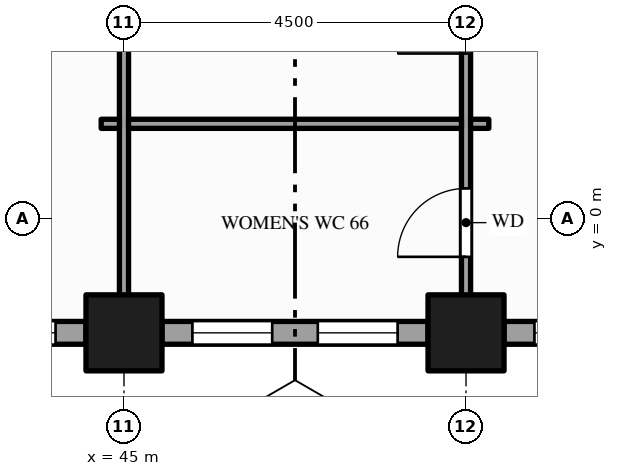
"""IFC4 building model, lengths in metres.
Left out: names, types, materials, properties, quantities, classifications, styles, units other than length and angle.
Written with IfcOpenShell. Run it as: python <this file> out.ifc"""

import sys

from ifc_helpers import new_model, si_unit, direction, frame, frame_2d, origin, origin_2d, place, context, subcontext, project, spatial, rectangle, hollow_rectangle, extrude, element, fill, save


model = new_model("IFC4")
c1 = context("Model", 3, precision=1e-05, world=origin(), true_north=direction((0.0, 1.0)))
c2 = subcontext(c1, "Body", "Model", "MODEL_VIEW")
j1 = project(units=[si_unit("LENGTHUNIT", "METRE"), si_unit("PLANEANGLEUNIT", "RADIAN")], contexts=[c1])
p1 = place(None, origin())
s1 = spatial("IfcSite", under=j1, at=p1, CompositionType="ELEMENT")
p2 = place(p1, origin())
s2 = spatial("IfcBuilding", under=s1, at=p2, CompositionType="ELEMENT")
p3 = place(p2, frame((0.0, 0.0, 103.0)))
s3 = spatial("IfcBuildingStorey", under=s2, at=p3, CompositionType="ELEMENT", Elevation=103.0)
for number, where, z_axis, x_axis in (
    (1, (45.0, -1.5, -0.15), (0.0, 0.0, 1.0), (1.0, 0.0, 0.0)),
    (2, (49.5, -1.5, -0.15), (0.0, 0.0, 1.0), (1.0, 0.0, 0.0)),
):
    element("IfcColumn", number, at=place(p3, frame(where, z_axis=z_axis, x_axis=x_axis)), inside=s3, PredefinedType="COLUMN", context=c2, shape_type="SweptSolid", body=[
        extrude(hollow_rectangle(XDim=1.0, YDim=1.0, WallThickness=0.05, at=origin_2d()), origin(), (0.0, 0.0, 1.0), 4.0),
    ])
p4 = place(p3, frame((41.0, -1.5, 0.0), z_axis=(0.0, 0.0, 1.0), x_axis=(1.0, 0.0, 0.0)))
e3 = element("IfcWall", 3, at=p4, inside=s3, PredefinedType="STANDARD", context=c2, shape_type="SweptSolid", body=[
    extrude(rectangle(XDim=3.5, YDim=0.3, at=frame_2d((1.75, 0.0))), origin(), (0.0, 0.0, 1.0), 3.154),
])
p5 = place(p4, frame((0.4, 0.0, 0.9)))
e4 = element("IfcOpeningElement", 4, at=p5, cuts=e3, PredefinedType="OPENING", context=c2, shape_type="SweptSolid", body=[
    extrude(rectangle(XDim=1.05, YDim=2.0, at=frame_2d((0.525, 1.0))), frame((0.0, 0.16, 0.0), z_axis=(0.0, -1.0, 0.0), x_axis=(1.0, 0.0, 0.0)), (0.0, 0.0, 1.0), 0.32),
])
p6 = place(p4, frame((2.05, 0.0, 0.9)))
e5 = element("IfcOpeningElement", 5, at=p6, cuts=e3, PredefinedType="OPENING", context=c2, shape_type="SweptSolid", body=[
    extrude(rectangle(XDim=1.05, YDim=2.0, at=frame_2d((0.525, 1.0))), frame((0.0, 0.16, 0.0), z_axis=(0.0, -1.0, 0.0), x_axis=(1.0, 0.0, 0.0)), (0.0, 0.0, 1.0), 0.32),
])
p7 = place(p3, frame((45.5, -1.5, 0.0), z_axis=(0.0, 0.0, 1.0), x_axis=(1.0, 0.0, 0.0)))
e6 = element("IfcWall", 6, at=p7, inside=s3, PredefinedType="STANDARD", context=c2, shape_type="SweptSolid", body=[
    extrude(rectangle(XDim=3.5, YDim=0.3, at=frame_2d((1.75, 0.0))), origin(), (0.0, 0.0, 1.0), 3.154),
])
p8 = place(p7, frame((0.4, 0.0, 0.9)))
e7 = element("IfcOpeningElement", 7, at=p8, cuts=e6, PredefinedType="OPENING", context=c2, shape_type="SweptSolid", body=[
    extrude(rectangle(XDim=1.05, YDim=2.0, at=frame_2d((0.525, 1.0))), frame((0.0, 0.16, 0.0), z_axis=(0.0, -1.0, 0.0), x_axis=(1.0, 0.0, 0.0)), (0.0, 0.0, 1.0), 0.32),
])
p9 = place(p7, frame((2.05, 0.0, 0.9)))
e8 = element("IfcOpeningElement", 8, at=p9, cuts=e6, PredefinedType="OPENING", context=c2, shape_type="SweptSolid", body=[
    extrude(rectangle(XDim=1.05, YDim=2.0, at=frame_2d((0.525, 1.0))), frame((0.0, 0.16, 0.0), z_axis=(0.0, -1.0, 0.0), x_axis=(1.0, 0.0, 0.0)), (0.0, 0.0, 1.0), 0.32),
])
p10 = place(p3, frame((50.0, -1.5, 0.0), z_axis=(0.0, 0.0, 1.0), x_axis=(1.0, 0.0, 0.0)))
e9 = element("IfcWall", 9, at=p10, inside=s3, PredefinedType="STANDARD", context=c2, shape_type="SweptSolid", body=[
    extrude(rectangle(XDim=3.5, YDim=0.3, at=frame_2d((1.75, 0.0))), origin(), (0.0, 0.0, 1.0), 3.154),
])
p11 = place(p10, frame((0.4, 0.0, 0.9)))
e10 = element("IfcOpeningElement", 10, at=p11, cuts=e9, PredefinedType="OPENING", context=c2, shape_type="SweptSolid", body=[
    extrude(rectangle(XDim=1.05, YDim=2.0, at=frame_2d((0.525, 1.0))), frame((0.0, 0.16, 0.0), z_axis=(0.0, -1.0, 0.0), x_axis=(1.0, 0.0, 0.0)), (0.0, 0.0, 1.0), 0.32),
])
p12 = place(p10, frame((2.05, 0.0, 0.9)))
e11 = element("IfcOpeningElement", 11, at=p12, cuts=e9, PredefinedType="OPENING", context=c2, shape_type="SweptSolid", body=[
    extrude(rectangle(XDim=1.05, YDim=2.0, at=frame_2d((0.525, 1.0))), frame((0.0, 0.16, 0.0), z_axis=(0.0, -1.0, 0.0), x_axis=(1.0, 0.0, 0.0)), (0.0, 0.0, 1.0), 0.32),
])
p13 = place(p3, frame((45.0, -1.35, 0.0), z_axis=(0.0, 0.0, 1.0), x_axis=(0.0, 1.0, 0.0)))
e12 = element("IfcWall", 12, at=p13, inside=s3, PredefinedType="PARTITIONING", context=c2, shape_type="SweptSolid", body=[
    extrude(rectangle(XDim=8.4, YDim=0.12, at=frame_2d((4.2, 0.0))), origin(), (0.0, 0.0, 1.0), 2.938),
])
p14 = place(p3, frame((49.5, -1.35, 0.0), z_axis=(0.0, 0.0, 1.0), x_axis=(0.0, 1.0, 0.0)))
e13 = element("IfcWall", 13, at=p14, inside=s3, PredefinedType="PARTITIONING", context=c2, shape_type="SweptSolid", body=[
    extrude(rectangle(XDim=22.2, YDim=0.12, at=frame_2d((11.1, 0.0))), origin(), (0.0, 0.0, 1.0), 2.938),
])
p15 = place(p14, frame((8.325, 0.0, 0.0)))
e14 = element("IfcOpeningElement", 14, at=p15, cuts=e13, PredefinedType="OPENING", context=c2, shape_type="SweptSolid", body=[
    extrude(rectangle(XDim=1.8, YDim=2.1, at=frame_2d((0.9, 1.05))), frame((0.0, 0.07, 0.0), z_axis=(0.0, -1.0, 0.0), x_axis=(1.0, 0.0, 0.0)), (0.0, 0.0, 1.0), 0.14),
])
p16 = place(p14, frame((0.85, 0.0, 0.0)))
e15 = element("IfcOpeningElement", 15, at=p16, cuts=e13, PredefinedType="OPENING", context=c2, shape_type="SweptSolid", body=[
    extrude(rectangle(XDim=0.9, YDim=2.1, at=frame_2d((0.45, 1.05))), frame((0.0, 0.07, 0.0), z_axis=(0.0, -1.0, 0.0), x_axis=(1.0, 0.0, 0.0)), (0.0, 0.0, 1.0), 0.14),
])
p17 = place(p14, frame((3.525, 0.0, 0.0)))
e16 = element("IfcOpeningElement", 16, at=p17, cuts=e13, PredefinedType="OPENING", context=c2, shape_type="SweptSolid", body=[
    extrude(rectangle(XDim=0.9, YDim=2.1, at=frame_2d((0.45, 1.05))), frame((0.0, 0.07, 0.0), z_axis=(0.0, -1.0, 0.0), x_axis=(1.0, 0.0, 0.0)), (0.0, 0.0, 1.0), 0.14),
])
p18 = place(p14, frame((6.1, 0.0, 0.0)))
e17 = element("IfcOpeningElement", 17, at=p18, cuts=e13, PredefinedType="OPENING", context=c2, shape_type="SweptSolid", body=[
    extrude(rectangle(XDim=1.0, YDim=2.1, at=frame_2d((0.5, 1.05))), frame((0.0, 0.07, 0.0), z_axis=(0.0, -1.0, 0.0), x_axis=(1.0, 0.0, 0.0)), (0.0, 0.0, 1.0), 0.14),
])
p19 = place(p3, frame((44.7, 1.25, 0.0), z_axis=(0.0, 0.0, 1.0), x_axis=(1.0, 0.0, 0.0)))
e18 = element("IfcWall", 18, at=p19, inside=s3, PredefinedType="PARTITIONING", context=c2, shape_type="SweptSolid", body=[
    extrude(rectangle(XDim=0.24, YDim=0.12, at=frame_2d((0.12, 0.0))), origin(), (0.0, 0.0, 1.0), 2.938),
])
p20 = place(p3, frame((45.06, 1.25, 0.0), z_axis=(0.0, 0.0, 1.0), x_axis=(1.0, 0.0, 0.0)))
e19 = element("IfcWall", 19, at=p20, inside=s3, PredefinedType="PARTITIONING", context=c2, shape_type="SweptSolid", body=[
    extrude(rectangle(XDim=4.38, YDim=0.12, at=frame_2d((2.19, 0.0))), origin(), (0.0, 0.0, 1.0), 2.938),
])
p21 = place(p3, frame((49.56, 1.25, 0.0), z_axis=(0.0, 0.0, 1.0), x_axis=(1.0, 0.0, 0.0)))
e20 = element("IfcWall", 20, at=p21, inside=s3, PredefinedType="PARTITIONING", context=c2, shape_type="SweptSolid", body=[
    extrude(rectangle(XDim=0.24, YDim=0.12, at=frame_2d((0.12, 0.0))), origin(), (0.0, 0.0, 1.0), 2.938),
])
p22 = place(p6, origin())
e21 = element("IfcWindow", 21, at=p22, inside=s3, PartitioningType="SINGLE_PANEL", PredefinedType="WINDOW", context=c2, shape_type="SweptSolid", body=[
    extrude(rectangle(XDim=1.05, YDim=2.0, at=frame_2d((0.525, 1.0))), frame((0.0, 0.03, 0.0), z_axis=(0.0, -1.0, 0.0), x_axis=(1.0, 0.0, 0.0)), (0.0, 0.0, 1.0), 0.06),
])
fill(e5, e21)
p23 = place(p8, origin())
e22 = element("IfcWindow", 22, at=p23, inside=s3, PartitioningType="SINGLE_PANEL", PredefinedType="WINDOW", context=c2, shape_type="SweptSolid", body=[
    extrude(rectangle(XDim=1.05, YDim=2.0, at=frame_2d((0.525, 1.0))), frame((0.0, 0.03, 0.0), z_axis=(0.0, -1.0, 0.0), x_axis=(1.0, 0.0, 0.0)), (0.0, 0.0, 1.0), 0.06),
])
fill(e7, e22)
p24 = place(p9, origin())
e23 = element("IfcWindow", 23, at=p24, inside=s3, PartitioningType="SINGLE_PANEL", PredefinedType="WINDOW", context=c2, shape_type="SweptSolid", body=[
    extrude(rectangle(XDim=1.05, YDim=2.0, at=frame_2d((0.525, 1.0))), frame((0.0, 0.03, 0.0), z_axis=(0.0, -1.0, 0.0), x_axis=(1.0, 0.0, 0.0)), (0.0, 0.0, 1.0), 0.06),
])
fill(e8, e23)
p25 = place(p11, origin())
e24 = element("IfcWindow", 24, at=p25, inside=s3, PartitioningType="SINGLE_PANEL", PredefinedType="WINDOW", context=c2, shape_type="SweptSolid", body=[
    extrude(rectangle(XDim=1.05, YDim=2.0, at=frame_2d((0.525, 1.0))), frame((0.0, 0.03, 0.0), z_axis=(0.0, -1.0, 0.0), x_axis=(1.0, 0.0, 0.0)), (0.0, 0.0, 1.0), 0.06),
])
fill(e10, e24)
p26 = place(p16, origin())
e25 = element("IfcDoor", 25, at=p26, inside=s3, OperationType="SINGLE_SWING_LEFT", PredefinedType="DOOR", context=c2, shape_type="SweptSolid", body=[
    extrude(rectangle(XDim=0.9, YDim=2.1, at=frame_2d((0.45, 1.05))), frame((0.0, 0.025, 0.0), z_axis=(0.0, -1.0, 0.0), x_axis=(1.0, 0.0, 0.0)), (0.0, 0.0, 1.0), 0.05),
])
fill(e15, e25)
p27 = place(p17, origin())
e26 = element("IfcDoor", 26, at=p27, inside=s3, OperationType="SINGLE_SWING_LEFT", PredefinedType="DOOR", context=c2, shape_type="SweptSolid", body=[
    extrude(rectangle(XDim=0.9, YDim=2.1, at=frame_2d((0.45, 1.05))), frame((0.0, 0.025, 0.0), z_axis=(0.0, -1.0, 0.0), x_axis=(1.0, 0.0, 0.0)), (0.0, 0.0, 1.0), 0.05),
])
fill(e16, e26)
save(model, sys.argv[1])
